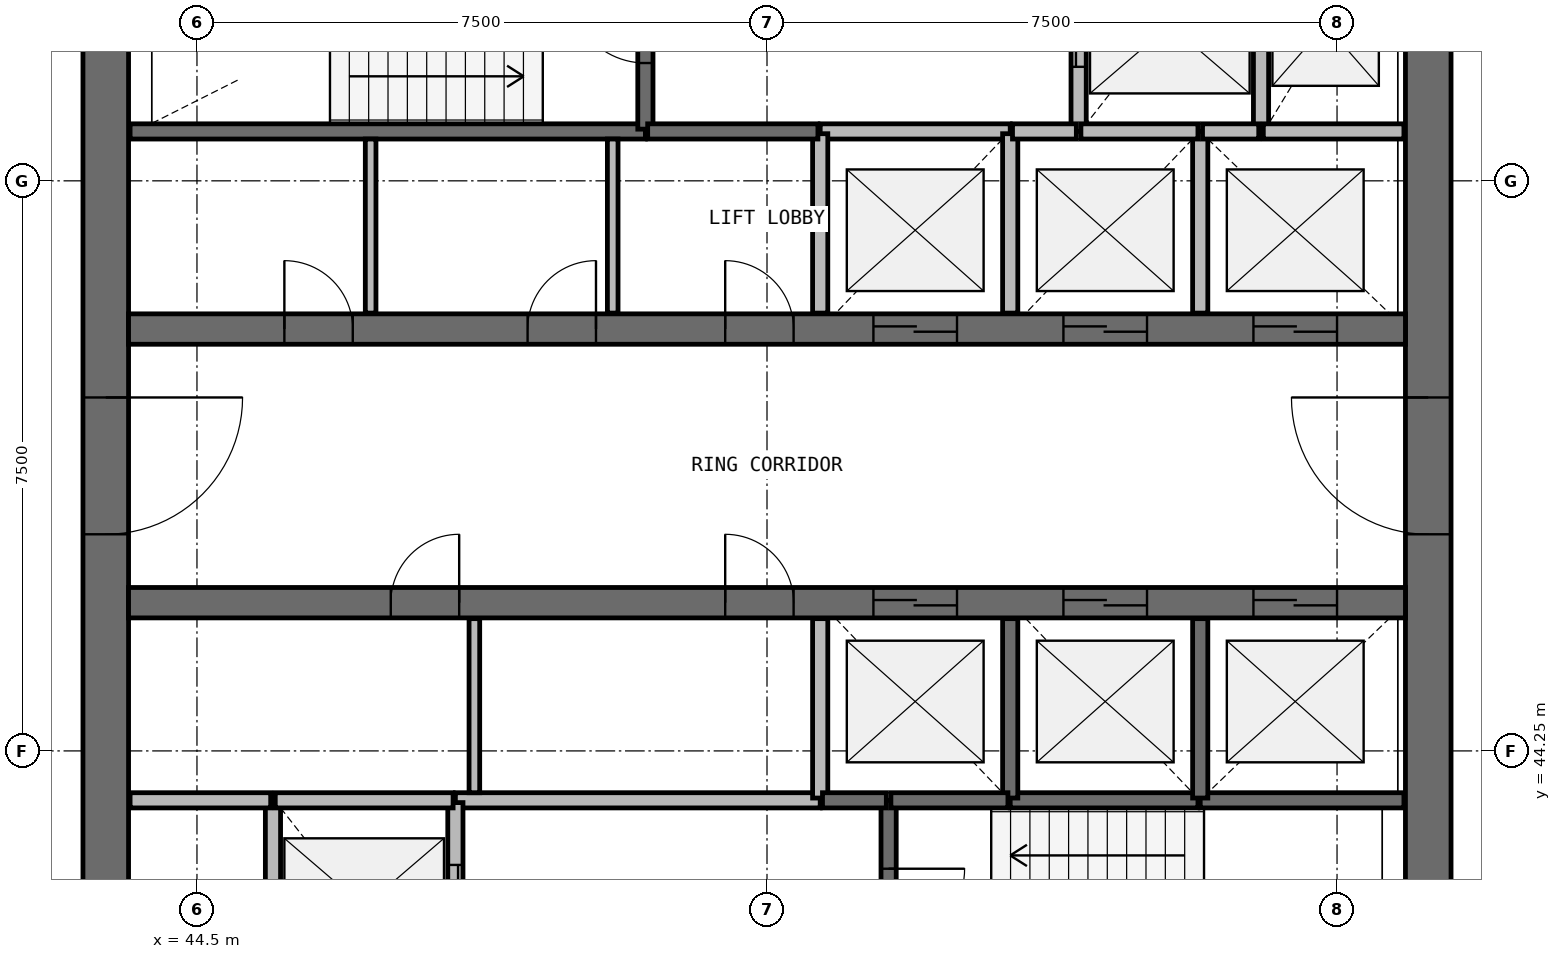
"""IFC4 building model, lengths in metres.
Left out: names, types, materials, properties, quantities, classifications, styles, units other than length and angle.
Written with IfcOpenShell. Run it as: python <this file> out.ifc"""

import sys

from ifc_helpers import new_model, si_unit, direction, frame, frame_2d, origin, place, context, subcontext, project, spatial, rectangle, extrude, source, transform, mapped, element, fill, save


model = new_model("IFC4")
c1 = context("Model", 3, precision=1e-05, world=origin(), true_north=direction((0.0, 1.0)))
c2 = subcontext(c1, "Body", "Model", "MODEL_VIEW")
j1 = project(units=[si_unit("LENGTHUNIT", "METRE"), si_unit("PLANEANGLEUNIT", "RADIAN")], contexts=[c1])
p1 = place(None, origin())
s1 = spatial("IfcSite", under=j1, at=p1, CompositionType="ELEMENT")
p2 = place(p1, origin())
s2 = spatial("IfcBuilding", under=s1, at=p2, CompositionType="ELEMENT")
p3 = place(p2, frame((0.0, 0.0, 218.9)))
s3 = spatial("IfcBuildingStorey", under=s2, at=p3, CompositionType="ELEMENT", Elevation=218.9)
p4 = place(p3, frame((60.7, 40.0, 0.0), z_axis=(0.0, 0.0, 1.0), x_axis=(0.0, 1.0, 0.0)))
e1 = element("IfcWall", 1, at=p4, inside=s3, PredefinedType="SHEAR", context=c2, shape_type="SweptSolid", body=[
    extrude(rectangle(XDim=16.0, YDim=0.6, at=frame_2d((8.0, 0.0))), origin(), (0.0, 0.0, 1.0), 3.9),
])
p5 = place(p4, frame((7.1, 0.0, 0.0)))
e2 = element("IfcOpeningElement", 2, at=p5, cuts=e1, PredefinedType="OPENING", context=c2, shape_type="SweptSolid", body=[
    extrude(rectangle(XDim=1.8, YDim=2.1, at=frame_2d((0.9, 1.05))), frame((0.0, 0.31, 0.0), z_axis=(0.0, -1.0, 0.0), x_axis=(1.0, 0.0, 0.0)), (0.0, 0.0, 1.0), 0.62),
])
p6 = place(p3, frame((43.3, 56.0, 0.0), z_axis=(0.0, 0.0, 1.0), x_axis=(0.0, -1.0, 0.0)))
e3 = element("IfcWall", 3, at=p6, inside=s3, PredefinedType="SHEAR", context=c2, shape_type="SweptSolid", body=[
    extrude(rectangle(XDim=16.0, YDim=0.6, at=frame_2d((8.0, 0.0))), origin(), (0.0, 0.0, 1.0), 3.9),
])
p7 = place(p6, frame((7.1, 0.0, 0.0)))
e4 = element("IfcOpeningElement", 4, at=p7, cuts=e3, PredefinedType="OPENING", context=c2, shape_type="SweptSolid", body=[
    extrude(rectangle(XDim=1.8, YDim=2.1, at=frame_2d((0.9, 1.05))), frame((0.0, 0.31, 0.0), z_axis=(0.0, -1.0, 0.0), x_axis=(1.0, 0.0, 0.0)), (0.0, 0.0, 1.0), 0.62),
])
p8 = place(p3, frame((43.6, 49.8, 0.0), z_axis=(0.0, 0.0, 1.0), x_axis=(1.0, 0.0, 0.0)))
e5 = element("IfcWall", 5, at=p8, inside=s3, PredefinedType="SHEAR", context=c2, shape_type="SweptSolid", body=[
    extrude(rectangle(XDim=16.8, YDim=0.4, at=frame_2d((8.4, 0.0))), origin(), (0.0, 0.0, 1.0), 3.9),
])
p9 = place(p8, frame((9.8, 0.0, 0.0)))
e6 = element("IfcOpeningElement", 6, at=p9, cuts=e5, PredefinedType="OPENING", context=c2, shape_type="SweptSolid", body=[
    extrude(rectangle(XDim=1.1, YDim=2.1, at=frame_2d((0.55, 1.05))), frame((0.0, 0.21, 0.0), z_axis=(0.0, -1.0, 0.0), x_axis=(1.0, 0.0, 0.0)), (0.0, 0.0, 1.0), 0.42),
])
p10 = place(p8, frame((12.3, 0.0, 0.0)))
e7 = element("IfcOpeningElement", 7, at=p10, cuts=e5, PredefinedType="OPENING", context=c2, shape_type="SweptSolid", body=[
    extrude(rectangle(XDim=1.1, YDim=2.1, at=frame_2d((0.55, 1.05))), frame((0.0, 0.21, 0.0), z_axis=(0.0, -1.0, 0.0), x_axis=(1.0, 0.0, 0.0)), (0.0, 0.0, 1.0), 0.42),
])
p11 = place(p8, frame((14.8, 0.0, 0.0)))
e8 = element("IfcOpeningElement", 8, at=p11, cuts=e5, PredefinedType="OPENING", context=c2, shape_type="SweptSolid", body=[
    extrude(rectangle(XDim=1.1, YDim=2.1, at=frame_2d((0.55, 1.05))), frame((0.0, 0.21, 0.0), z_axis=(0.0, -1.0, 0.0), x_axis=(1.0, 0.0, 0.0)), (0.0, 0.0, 1.0), 0.42),
])
p12 = place(p8, frame((2.05, 0.0, 0.0)))
e9 = element("IfcOpeningElement", 9, at=p12, cuts=e5, PredefinedType="OPENING", context=c2, shape_type="SweptSolid", body=[
    extrude(rectangle(XDim=0.9, YDim=2.1, at=frame_2d((0.45, 1.05))), frame((0.0, 0.21, 0.0), z_axis=(0.0, -1.0, 0.0), x_axis=(1.0, 0.0, 0.0)), (0.0, 0.0, 1.0), 0.42),
])
p13 = place(p8, frame((5.25, 0.0, 0.0)))
e10 = element("IfcOpeningElement", 10, at=p13, cuts=e5, PredefinedType="OPENING", context=c2, shape_type="SweptSolid", body=[
    extrude(rectangle(XDim=0.9, YDim=2.1, at=frame_2d((0.45, 1.05))), frame((0.0, 0.21, 0.0), z_axis=(0.0, -1.0, 0.0), x_axis=(1.0, 0.0, 0.0)), (0.0, 0.0, 1.0), 0.42),
])
p14 = place(p8, frame((7.85, 0.0, 0.0)))
e11 = element("IfcOpeningElement", 11, at=p14, cuts=e5, PredefinedType="OPENING", context=c2, shape_type="SweptSolid", body=[
    extrude(rectangle(XDim=0.9, YDim=2.1, at=frame_2d((0.45, 1.05))), frame((0.0, 0.21, 0.0), z_axis=(0.0, -1.0, 0.0), x_axis=(1.0, 0.0, 0.0)), (0.0, 0.0, 1.0), 0.42),
])
p15 = place(p3, frame((43.6, 46.2, 0.0), z_axis=(0.0, 0.0, 1.0), x_axis=(1.0, 0.0, 0.0)))
e12 = element("IfcWall", 12, at=p15, inside=s3, PredefinedType="SHEAR", context=c2, shape_type="SweptSolid", body=[
    extrude(rectangle(XDim=16.8, YDim=0.4, at=frame_2d((8.4, 0.0))), origin(), (0.0, 0.0, 1.0), 3.9),
])
p16 = place(p15, frame((9.8, 0.0, 0.0)))
e13 = element("IfcOpeningElement", 13, at=p16, cuts=e12, PredefinedType="OPENING", context=c2, shape_type="SweptSolid", body=[
    extrude(rectangle(XDim=1.1, YDim=2.1, at=frame_2d((0.55, 1.05))), frame((0.0, 0.21, 0.0), z_axis=(0.0, -1.0, 0.0), x_axis=(1.0, 0.0, 0.0)), (0.0, 0.0, 1.0), 0.42),
])
p17 = place(p15, frame((12.3, 0.0, 0.0)))
e14 = element("IfcOpeningElement", 14, at=p17, cuts=e12, PredefinedType="OPENING", context=c2, shape_type="SweptSolid", body=[
    extrude(rectangle(XDim=1.1, YDim=2.1, at=frame_2d((0.55, 1.05))), frame((0.0, 0.21, 0.0), z_axis=(0.0, -1.0, 0.0), x_axis=(1.0, 0.0, 0.0)), (0.0, 0.0, 1.0), 0.42),
])
p18 = place(p15, frame((14.8, 0.0, 0.0)))
e15 = element("IfcOpeningElement", 15, at=p18, cuts=e12, PredefinedType="OPENING", context=c2, shape_type="SweptSolid", body=[
    extrude(rectangle(XDim=1.1, YDim=2.1, at=frame_2d((0.55, 1.05))), frame((0.0, 0.21, 0.0), z_axis=(0.0, -1.0, 0.0), x_axis=(1.0, 0.0, 0.0)), (0.0, 0.0, 1.0), 0.42),
])
p19 = place(p15, frame((3.45, 0.0, 0.0)))
e16 = element("IfcOpeningElement", 16, at=p19, cuts=e12, PredefinedType="OPENING", context=c2, shape_type="SweptSolid", body=[
    extrude(rectangle(XDim=0.9, YDim=2.1, at=frame_2d((0.45, 1.05))), frame((0.0, 0.21, 0.0), z_axis=(0.0, -1.0, 0.0), x_axis=(1.0, 0.0, 0.0)), (0.0, 0.0, 1.0), 0.42),
])
p20 = place(p15, frame((7.85, 0.0, 0.0)))
e17 = element("IfcOpeningElement", 17, at=p20, cuts=e12, PredefinedType="OPENING", context=c2, shape_type="SweptSolid", body=[
    extrude(rectangle(XDim=0.9, YDim=2.1, at=frame_2d((0.45, 1.05))), frame((0.0, 0.21, 0.0), z_axis=(0.0, -1.0, 0.0), x_axis=(1.0, 0.0, 0.0)), (0.0, 0.0, 1.0), 0.42),
])
p21 = place(p3, frame((43.62, 52.4, 0.0), z_axis=(0.0, 0.0, 1.0), x_axis=(1.0, 0.0, 0.0)))
e18 = element("IfcWall", 18, at=p21, inside=s3, PredefinedType="SOLIDWALL", context=c2, shape_type="SweptSolid", body=[
    extrude(rectangle(XDim=6.78, YDim=0.2, at=frame_2d((3.39, 0.0))), origin(), (0.0, 0.0, 1.0), 3.58),
])
p22 = place(p3, frame((52.7, 43.6, 0.0), z_axis=(0.0, 0.0, 1.0), x_axis=(-1.0, 0.0, 0.0)))
e19 = element("IfcWall", 19, at=p22, inside=s3, PredefinedType="SOLIDWALL", context=c2, shape_type="SweptSolid", body=[
    extrude(rectangle(XDim=4.8, YDim=0.2, at=frame_2d((2.4, 0.0))), origin(), (0.0, 0.0, 1.0), 3.58),
])
p23 = place(p3, frame((45.5, 43.6, 0.0), z_axis=(0.0, 0.0, 1.0), x_axis=(0.0, -1.0, 0.0)))
e20 = element("IfcWall", 20, at=p23, inside=s3, PredefinedType="SOLIDWALL", context=c2, shape_type="SweptSolid", body=[
    extrude(rectangle(XDim=2.98, YDim=0.2, at=frame_2d((1.49, 0.0))), origin(), (0.0, 0.0, 1.0), 3.58),
])
p24 = place(p3, frame((47.9, 40.62, 0.0), z_axis=(0.0, 0.0, 1.0), x_axis=(0.0, 1.0, 0.0)))
e21 = element("IfcWall", 21, at=p24, inside=s3, PredefinedType="SOLIDWALL", context=c2, shape_type="SweptSolid", body=[
    extrude(rectangle(XDim=2.95, YDim=0.2, at=frame_2d((1.475, 0.0))), origin(), (0.0, 0.0, 1.0), 3.58),
])
p25 = place(p24, frame((1.03, 0.0, 0.0)))
e22 = element("IfcOpeningElement", 22, at=p25, cuts=e21, PredefinedType="OPENING", context=c2, shape_type="SweptSolid", body=[
    extrude(rectangle(XDim=1.1, YDim=2.1, at=frame_2d((0.55, 1.05))), frame((0.0, 0.11, 0.0), z_axis=(0.0, -1.0, 0.0), x_axis=(1.0, 0.0, 0.0)), (0.0, 0.0, 1.0), 0.22),
])
p26 = place(p3, frame((50.4, 52.43, 0.0), z_axis=(0.0, 0.0, 1.0), x_axis=(0.0, 1.0, 0.0)))
e23 = element("IfcWall", 23, at=p26, inside=s3, PredefinedType="SOLIDWALL", context=c2, shape_type="SweptSolid", body=[
    extrude(rectangle(XDim=2.95, YDim=0.2, at=frame_2d((1.475, 0.0))), origin(), (0.0, 0.0, 1.0), 3.58),
])
p27 = place(p26, frame((0.87, 0.0, 0.0)))
e24 = element("IfcOpeningElement", 24, at=p27, cuts=e23, PredefinedType="OPENING", context=c2, shape_type="SweptSolid", body=[
    extrude(rectangle(XDim=1.0, YDim=2.1, at=frame_2d((0.5, 1.05))), frame((0.0, 0.11, 0.0), z_axis=(0.0, -1.0, 0.0), x_axis=(1.0, 0.0, 0.0)), (0.0, 0.0, 1.0), 0.22),
])
p28 = place(p3, frame((53.6, 43.6, 0.0), z_axis=(0.0, 0.0, 1.0), x_axis=(0.0, -1.0, 0.0)))
e25 = element("IfcWall", 25, at=p28, inside=s3, PredefinedType="SOLIDWALL", context=c2, shape_type="SweptSolid", body=[
    extrude(rectangle(XDim=2.98, YDim=0.2, at=frame_2d((1.49, 0.0))), origin(), (0.0, 0.0, 1.0), 3.58),
])
p29 = place(p28, frame((0.9, 0.0, 0.0)))
e26 = element("IfcOpeningElement", 26, at=p29, cuts=e25, PredefinedType="OPENING", context=c2, shape_type="SweptSolid", body=[
    extrude(rectangle(XDim=1.0, YDim=2.1, at=frame_2d((0.5, 1.05))), frame((0.0, 0.11, 0.0), z_axis=(0.0, -1.0, 0.0), x_axis=(1.0, 0.0, 0.0)), (0.0, 0.0, 1.0), 0.22),
])
p30 = place(p3, frame((56.1, 55.38, 0.0), z_axis=(0.0, 0.0, 1.0), x_axis=(0.0, -1.0, 0.0)))
e27 = element("IfcWall", 27, at=p30, inside=s3, PredefinedType="SOLIDWALL", context=c2, shape_type="SweptSolid", body=[
    extrude(rectangle(XDim=2.98, YDim=0.2, at=frame_2d((1.49, 0.0))), origin(), (0.0, 0.0, 1.0), 3.58),
])
p31 = place(p30, frame((1.03, 0.0, 0.0)))
e28 = element("IfcOpeningElement", 28, at=p31, cuts=e27, PredefinedType="OPENING", context=c2, shape_type="SweptSolid", body=[
    extrude(rectangle(XDim=1.1, YDim=2.1, at=frame_2d((0.55, 1.05))), frame((0.0, 0.11, 0.0), z_axis=(0.0, -1.0, 0.0), x_axis=(1.0, 0.0, 0.0)), (0.0, 0.0, 1.0), 0.22),
])
p32 = place(p3, frame((58.5, 52.4, 0.0), z_axis=(0.0, 0.0, 1.0), x_axis=(0.0, 1.0, 0.0)))
e29 = element("IfcWall", 29, at=p32, inside=s3, PredefinedType="SOLIDWALL", context=c2, shape_type="SweptSolid", body=[
    extrude(rectangle(XDim=2.98, YDim=0.2, at=frame_2d((1.49, 0.0))), origin(), (0.0, 0.0, 1.0), 3.58),
])
p33 = place(p3, frame((57.7, 43.6, 0.0), z_axis=(0.0, 0.0, 1.0), x_axis=(1.0, 0.0, 0.0)))
e30 = element("IfcWall", 30, at=p33, inside=s3, PredefinedType="SOLIDWALL", context=c2, shape_type="SweptSolid", body=[
    extrude(rectangle(XDim=2.68, YDim=0.2, at=frame_2d((1.34, 0.0))), origin(), (0.0, 0.0, 1.0), 3.58),
])
p34 = place(p3, frame((55.2, 52.4, 0.0), z_axis=(0.0, 0.0, 1.0), x_axis=(-1.0, 0.0, 0.0)))
e31 = element("IfcWall", 31, at=p34, inside=s3, PredefinedType="SOLIDWALL", context=c2, shape_type="SweptSolid", body=[
    extrude(rectangle(XDim=2.5, YDim=0.2, at=frame_2d((1.25, 0.0))), origin(), (0.0, 0.0, 1.0), 3.58),
])
p35 = place(p3, frame((55.2, 43.6, 0.0), z_axis=(0.0, 0.0, 1.0), x_axis=(1.0, 0.0, 0.0)))
e32 = element("IfcWall", 32, at=p35, inside=s3, PredefinedType="SOLIDWALL", context=c2, shape_type="SweptSolid", body=[
    extrude(rectangle(XDim=2.47, YDim=0.2, at=frame_2d((1.235, 0.0))), origin(), (0.0, 0.0, 1.0), 3.58),
])
p36 = place(p3, frame((47.87, 43.6, 0.0), z_axis=(0.0, 0.0, 1.0), x_axis=(-1.0, 0.0, 0.0)))
e33 = element("IfcWall", 33, at=p36, inside=s3, PredefinedType="SOLIDWALL", context=c2, shape_type="SweptSolid", body=[
    extrude(rectangle(XDim=2.34, YDim=0.2, at=frame_2d((1.17, 0.0))), origin(), (0.0, 0.0, 1.0), 3.58),
])
for number, where, z_axis, x_axis in (
    (34, (52.7, 45.99, 0.0), (0.0, 0.0, 1.0), (0.0, -1.0, 0.0)),
    (35, (52.7, 52.37, 0.0), (0.0, 0.0, 1.0), (0.0, -1.0, 0.0)),
    (36, (55.2, 43.63, 0.0), (0.0, 0.0, 1.0), (0.0, 1.0, 0.0)),
    (37, (55.2, 50.01, 0.0), (0.0, 0.0, 1.0), (0.0, 1.0, 0.0)),
    (38, (57.7, 43.63, 0.0), (0.0, 0.0, 1.0), (0.0, 1.0, 0.0)),
):
    element("IfcWall", number, at=place(p3, frame(where, z_axis=z_axis, x_axis=x_axis)), inside=s3, PredefinedType="SOLIDWALL", context=c2, shape_type="SweptSolid", body=[
        extrude(rectangle(XDim=2.36, YDim=0.2, at=frame_2d((1.18, 0.0))), origin(), (0.0, 0.0, 1.0), 3.58),
    ])
p37 = place(p3, frame((57.7, 50.01, 0.0), z_axis=(0.0, 0.0, 1.0), x_axis=(0.0, 1.0, 0.0)))
e39 = element("IfcWall", 39, at=p37, inside=s3, PredefinedType="SOLIDWALL", context=c2, shape_type="SweptSolid", body=[
    extrude(rectangle(XDim=2.39, YDim=0.2, at=frame_2d((1.195, 0.0))), origin(), (0.0, 0.0, 1.0), 3.58),
])
p38 = place(p3, frame((50.43, 52.4, 0.0), z_axis=(0.0, 0.0, 1.0), x_axis=(1.0, 0.0, 0.0)))
e40 = element("IfcWall", 40, at=p38, inside=s3, PredefinedType="SOLIDWALL", context=c2, shape_type="SweptSolid", body=[
    extrude(rectangle(XDim=2.24, YDim=0.2, at=frame_2d((1.12, 0.0))), origin(), (0.0, 0.0, 1.0), 3.58),
])
for number, where, z_axis, x_axis in (
    (41, (45.47, 43.6, 0.0), (0.0, 0.0, 1.0), (-1.0, 0.0, 0.0)),
    (42, (60.38, 52.4, 0.0), (0.0, 0.0, 1.0), (-1.0, 0.0, 0.0)),
):
    element("IfcWall", number, at=place(p3, frame(where, z_axis=z_axis, x_axis=x_axis)), inside=s3, PredefinedType="SOLIDWALL", context=c2, shape_type="SweptSolid", body=[
        extrude(rectangle(XDim=1.85, YDim=0.2, at=frame_2d((0.925, 0.0))), origin(), (0.0, 0.0, 1.0), 3.58),
    ])
for number, where, z_axis, x_axis in (
    (43, (53.63, 43.6, 0.0), (0.0, 0.0, 1.0), (1.0, 0.0, 0.0)),
    (44, (57.67, 52.4, 0.0), (0.0, 0.0, 1.0), (-1.0, 0.0, 0.0)),
):
    element("IfcWall", number, at=place(p3, frame(where, z_axis=z_axis, x_axis=x_axis)), inside=s3, PredefinedType="SOLIDWALL", context=c2, shape_type="SweptSolid", body=[
        extrude(rectangle(XDim=1.54, YDim=0.2, at=frame_2d((0.77, 0.0))), origin(), (0.0, 0.0, 1.0), 3.58),
    ])
for number, where, z_axis, x_axis in (
    (45, (52.73, 43.6, 0.0), (0.0, 0.0, 1.0), (1.0, 0.0, 0.0)),
    (46, (56.07, 52.4, 0.0), (0.0, 0.0, 1.0), (-1.0, 0.0, 0.0)),
):
    element("IfcWall", number, at=place(p3, frame(where, z_axis=z_axis, x_axis=x_axis)), inside=s3, PredefinedType="SOLIDWALL", context=c2, shape_type="SweptSolid", body=[
        extrude(rectangle(XDim=0.84, YDim=0.2, at=frame_2d((0.42, 0.0))), origin(), (0.0, 0.0, 1.0), 3.58),
    ])
p39 = place(p3, frame((58.47, 52.4, 0.0), z_axis=(0.0, 0.0, 1.0), x_axis=(-1.0, 0.0, 0.0)))
e47 = element("IfcWall", 47, at=p39, inside=s3, PredefinedType="SOLIDWALL", context=c2, shape_type="SweptSolid", body=[
    extrude(rectangle(XDim=0.74, YDim=0.2, at=frame_2d((0.37, 0.0))), origin(), (0.0, 0.0, 1.0), 3.58),
])
for number, where, z_axis, x_axis in (
    (48, (46.785, 50.01, 0.0), (0.0, 0.0, 1.0), (0.0, 1.0, 0.0)),
    (49, (48.15, 43.7, 0.0), (0.0, 0.0, 1.0), (0.0, 1.0, 0.0)),
    (50, (49.97, 50.01, 0.0), (0.0, 0.0, 1.0), (0.0, 1.0, 0.0)),
):
    element("IfcWall", number, at=place(p3, frame(where, z_axis=z_axis, x_axis=x_axis)), inside=s3, PredefinedType="PARTITIONING", context=c2, shape_type="SweptSolid", body=[
        extrude(rectangle(XDim=2.29, YDim=0.14, at=frame_2d((1.145, 0.0))), origin(), (0.0, 0.0, 1.0), 2.88),
    ])
m1 = source(origin(), c2, "Body", "SweptSolid", [
    extrude(rectangle(XDim=1.8, YDim=2.1, at=frame_2d((0.9, 1.05))), frame((0.0, 0.025, 0.0), z_axis=(0.0, -1.0, 0.0), x_axis=(1.0, 0.0, 0.0)), (0.0, 0.0, 1.0), 0.05),
])
p40 = place(p7, origin())
e51 = element("IfcDoor", 51, at=p40, inside=s3, OperationType="SINGLE_SWING_LEFT", PredefinedType="DOOR", context=c2, shape_type="MappedRepresentation", body=[
    mapped(m1, transform((0.0, 0.0, 0.0), scale=1.0)),
])
fill(e4, e51)
p41 = place(p5, origin())
e52 = element("IfcDoor", 52, at=p41, inside=s3, OperationType="SINGLE_SWING_RIGHT", PredefinedType="DOOR", context=c2, shape_type="MappedRepresentation", body=[
    mapped(m1, transform((0.0, 0.0, 0.0), scale=1.0)),
])
fill(e2, e52)
m2 = source(origin(), c2, "Body", "SweptSolid", [
    extrude(rectangle(XDim=1.1, YDim=2.1, at=frame_2d((0.55, 1.05))), frame((0.0, 0.025, 0.0), z_axis=(0.0, -1.0, 0.0), x_axis=(1.0, 0.0, 0.0)), (0.0, 0.0, 1.0), 0.05),
])
p42 = place(p9, origin())
e53 = element("IfcDoor", 53, at=p42, inside=s3, OperationType="DOUBLE_DOOR_SLIDING", PredefinedType="USERDEFINED", context=c2, shape_type="MappedRepresentation", body=[
    mapped(m2, transform((0.0, 0.0, 0.0), scale=1.0)),
])
fill(e6, e53)
p43 = place(p10, origin())
e54 = element("IfcDoor", 54, at=p43, inside=s3, OperationType="DOUBLE_DOOR_SLIDING", PredefinedType="USERDEFINED", context=c2, shape_type="MappedRepresentation", body=[
    mapped(m2, transform((0.0, 0.0, 0.0), scale=1.0)),
])
fill(e7, e54)
p44 = place(p11, origin())
e55 = element("IfcDoor", 55, at=p44, inside=s3, OperationType="DOUBLE_DOOR_SLIDING", PredefinedType="USERDEFINED", context=c2, shape_type="MappedRepresentation", body=[
    mapped(m2, transform((0.0, 0.0, 0.0), scale=1.0)),
])
fill(e8, e55)
p45 = place(p16, origin())
e56 = element("IfcDoor", 56, at=p45, inside=s3, OperationType="DOUBLE_DOOR_SLIDING", PredefinedType="USERDEFINED", context=c2, shape_type="MappedRepresentation", body=[
    mapped(m2, transform((0.0, 0.0, 0.0), scale=1.0)),
])
fill(e13, e56)
p46 = place(p17, origin())
e57 = element("IfcDoor", 57, at=p46, inside=s3, OperationType="DOUBLE_DOOR_SLIDING", PredefinedType="USERDEFINED", context=c2, shape_type="MappedRepresentation", body=[
    mapped(m2, transform((0.0, 0.0, 0.0), scale=1.0)),
])
fill(e14, e57)
p47 = place(p18, origin())
e58 = element("IfcDoor", 58, at=p47, inside=s3, OperationType="DOUBLE_DOOR_SLIDING", PredefinedType="USERDEFINED", context=c2, shape_type="MappedRepresentation", body=[
    mapped(m2, transform((0.0, 0.0, 0.0), scale=1.0)),
])
fill(e15, e58)
p48 = place(p31, origin())
e59 = element("IfcDoor", 59, at=p48, inside=s3, OperationType="DOUBLE_DOOR_SLIDING", PredefinedType="USERDEFINED", context=c2, shape_type="MappedRepresentation", body=[
    mapped(m2, transform((0.0, 0.0, 0.0), scale=1.0)),
])
fill(e28, e59)
p49 = place(p25, origin())
e60 = element("IfcDoor", 60, at=p49, inside=s3, OperationType="DOUBLE_DOOR_SLIDING", PredefinedType="USERDEFINED", context=c2, shape_type="MappedRepresentation", body=[
    mapped(m2, transform((0.0, 0.0, 0.0), scale=1.0)),
])
fill(e22, e60)
m3 = source(origin(), c2, "Body", "SweptSolid", [
    extrude(rectangle(XDim=1.0, YDim=2.1, at=frame_2d((0.5, 1.05))), frame((0.0, 0.025, 0.0), z_axis=(0.0, -1.0, 0.0), x_axis=(1.0, 0.0, 0.0)), (0.0, 0.0, 1.0), 0.05),
])
p50 = place(p27, origin())
e61 = element("IfcDoor", 61, at=p50, inside=s3, OperationType="SINGLE_SWING_RIGHT", PredefinedType="DOOR", context=c2, shape_type="MappedRepresentation", body=[
    mapped(m3, transform((0.0, 0.0, 0.0), scale=1.0)),
])
fill(e24, e61)
p51 = place(p29, origin())
e62 = element("IfcDoor", 62, at=p51, inside=s3, OperationType="SINGLE_SWING_LEFT", PredefinedType="DOOR", context=c2, shape_type="MappedRepresentation", body=[
    mapped(m3, transform((0.0, 0.0, 0.0), scale=1.0)),
])
fill(e26, e62)
m4 = source(origin(), c2, "Body", "SweptSolid", [
    extrude(rectangle(XDim=0.9, YDim=2.1, at=frame_2d((0.45, 1.05))), frame((0.0, 0.025, 0.0), z_axis=(0.0, -1.0, 0.0), x_axis=(1.0, 0.0, 0.0)), (0.0, 0.0, 1.0), 0.05),
])
p52 = place(p12, origin())
e63 = element("IfcDoor", 63, at=p52, inside=s3, OperationType="SINGLE_SWING_LEFT", PredefinedType="DOOR", context=c2, shape_type="MappedRepresentation", body=[
    mapped(m4, transform((0.0, 0.0, 0.0), scale=1.0)),
])
fill(e9, e63)
p53 = place(p13, origin())
e64 = element("IfcDoor", 64, at=p53, inside=s3, OperationType="SINGLE_SWING_RIGHT", PredefinedType="DOOR", context=c2, shape_type="MappedRepresentation", body=[
    mapped(m4, transform((0.0, 0.0, 0.0), scale=1.0)),
])
fill(e10, e64)
p54 = place(p14, origin())
e65 = element("IfcDoor", 65, at=p54, inside=s3, OperationType="SINGLE_SWING_LEFT", PredefinedType="DOOR", context=c2, shape_type="MappedRepresentation", body=[
    mapped(m4, transform((0.0, 0.0, 0.0), scale=1.0)),
])
fill(e11, e65)
p55 = place(p19, origin())
e66 = element("IfcDoor", 66, at=p55, inside=s3, OperationType="SINGLE_SWING_RIGHT", PredefinedType="DOOR", context=c2, shape_type="MappedRepresentation", body=[
    mapped(m4, transform((0.0, 0.0, 0.0), scale=1.0)),
])
fill(e16, e66)
p56 = place(p20, origin())
e67 = element("IfcDoor", 67, at=p56, inside=s3, OperationType="SINGLE_SWING_LEFT", PredefinedType="DOOR", context=c2, shape_type="MappedRepresentation", body=[
    mapped(m4, transform((0.0, 0.0, 0.0), scale=1.0)),
])
fill(e17, e67)
save(model, sys.argv[1])
